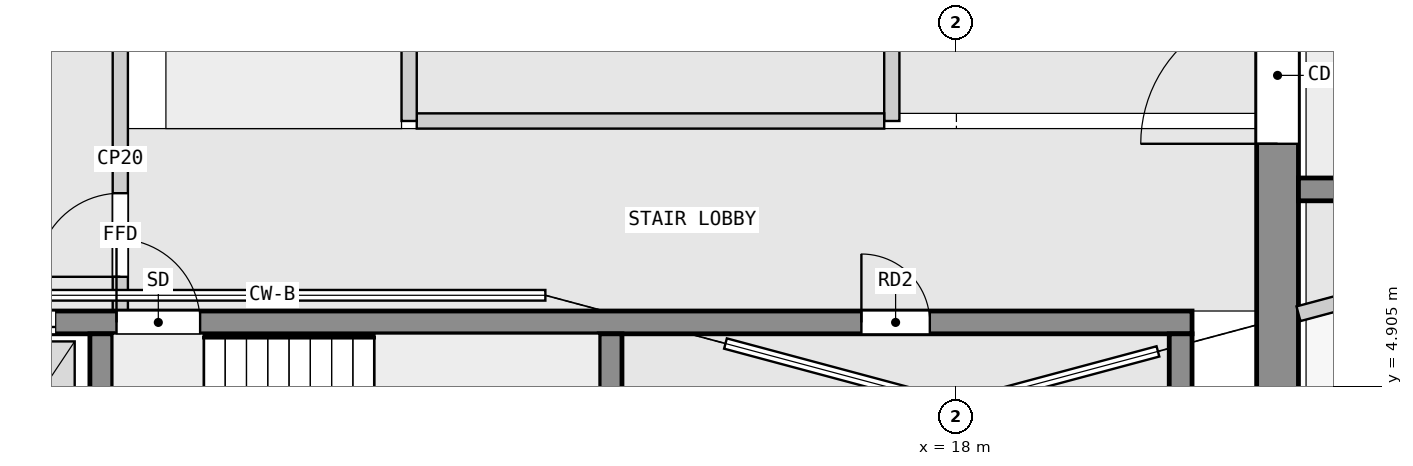
"""IFC4 building model, lengths in metres.
Left out: names, types, materials, properties, quantities, classifications, styles, units other than length and angle.
Written with IfcOpenShell. Run it as: python <this file> out.ifc"""

import sys

from ifc_helpers import new_model, si_unit, direction, frame, frame_2d, origin, place, context, subcontext, project, spatial, rectangle, extrude, element, fill, save


model = new_model("IFC4")
c1 = context("Model", 3, precision=1e-05, world=origin(), true_north=direction((0.0, 1.0)))
c2 = subcontext(c1, "Body", "Model", "MODEL_VIEW")
j1 = project(units=[si_unit("LENGTHUNIT", "METRE"), si_unit("PLANEANGLEUNIT", "RADIAN")], contexts=[c1])
p1 = place(None, origin())
s1 = spatial("IfcSite", under=j1, at=p1, CompositionType="ELEMENT")
p2 = place(p1, origin())
s2 = spatial("IfcBuilding", under=s1, at=p2, CompositionType="ELEMENT")
p3 = place(p2, frame((0.0, 0.0, 184.9)))
s3 = spatial("IfcBuildingStorey", under=s2, at=p3, CompositionType="ELEMENT", Elevation=184.9)
p4 = place(p3, frame((22.225, 2.5, 0.0), z_axis=(0.0, 0.0, 1.0), x_axis=(0.0, 1.0, 0.0)))
e1 = element("IfcWall", 1, at=p4, inside=s3, PredefinedType="SHEAR", context=c2, shape_type="SweptSolid", body=[
    extrude(rectangle(XDim=14.95, YDim=0.55, at=frame_2d((7.475, 0.0))), origin(), (0.0, 0.0, 1.0), 5.75),
])
p5 = place(p4, frame((5.6, 0.0, 0.0)))
e2 = element("IfcOpeningElement", 2, at=p5, cuts=e1, PredefinedType="OPENING", context=c2, shape_type="SweptSolid", body=[
    extrude(rectangle(XDim=1.8, YDim=2.1, at=frame_2d((0.9, 1.05))), frame((0.0, 0.285, 0.0), z_axis=(0.0, -1.0, 0.0), x_axis=(1.0, 0.0, 0.0)), (0.0, 0.0, 1.0), 0.57),
])
for number, where, z_axis, x_axis in (
    (3, (6.75, 2.8, 0.0), (0.0, 0.0, 1.0), (0.0, 1.0, 0.0)),
    (4, (13.45, 2.8, 0.0), (0.0, 0.0, 1.0), (0.0, 1.0, 0.0)),
    (5, (20.95, 2.8, 0.0), (0.0, 0.0, 1.0), (0.0, 1.0, 0.0)),
):
    element("IfcWall", number, at=place(p3, frame(where, z_axis=z_axis, x_axis=x_axis)), inside=s3, PredefinedType="SHEAR", context=c2, shape_type="SweptSolid", body=[
        extrude(rectangle(XDim=2.8, YDim=0.3, at=frame_2d((1.4, 0.0))), origin(), (0.0, 0.0, 1.0), 5.75),
    ])
p6 = place(p3, frame((2.3, 5.75, 0.0), z_axis=(0.0, 0.0, 1.0), x_axis=(1.0, 0.0, 0.0)))
e6 = element("IfcWall", 6, at=p6, inside=s3, PredefinedType="SHEAR", context=c2, shape_type="SweptSolid", body=[
    extrude(rectangle(XDim=18.8, YDim=0.3, at=frame_2d((9.4, 0.0))), origin(), (0.0, 0.0, 1.0), 5.75),
])
p7 = place(p6, frame((4.65, 0.0, 0.0)))
e7 = element("IfcOpeningElement", 7, at=p7, cuts=e6, PredefinedType="OPENING", context=c2, shape_type="SweptSolid", body=[
    extrude(rectangle(XDim=1.1, YDim=2.1, at=frame_2d((0.55, 1.05))), frame((0.0, 0.16, 0.0), z_axis=(0.0, -1.0, 0.0), x_axis=(1.0, 0.0, 0.0)), (0.0, 0.0, 1.0), 0.32),
])
p8 = place(p6, frame((0.45, 0.0, 0.0)))
e8 = element("IfcOpeningElement", 8, at=p8, cuts=e6, PredefinedType="OPENING", context=c2, shape_type="SweptSolid", body=[
    extrude(rectangle(XDim=1.1, YDim=2.1, at=frame_2d((0.55, 1.05))), frame((0.0, 0.16, 0.0), z_axis=(0.0, -1.0, 0.0), x_axis=(1.0, 0.0, 0.0)), (0.0, 0.0, 1.0), 0.32),
])
p9 = place(p6, frame((2.75, 0.0, 0.0)))
e9 = element("IfcOpeningElement", 9, at=p9, cuts=e6, PredefinedType="OPENING", context=c2, shape_type="SweptSolid", body=[
    extrude(rectangle(XDim=1.1, YDim=2.1, at=frame_2d((0.55, 1.05))), frame((0.0, 0.16, 0.0), z_axis=(0.0, -1.0, 0.0), x_axis=(1.0, 0.0, 0.0)), (0.0, 0.0, 1.0), 0.32),
])
p10 = place(p6, frame((14.45, 0.0, 0.0)))
e10 = element("IfcOpeningElement", 10, at=p10, cuts=e6, PredefinedType="OPENING", context=c2, shape_type="SweptSolid", body=[
    extrude(rectangle(XDim=0.9, YDim=2.1, at=frame_2d((0.45, 1.05))), frame((0.0, 0.16, 0.0), z_axis=(0.0, -1.0, 0.0), x_axis=(1.0, 0.0, 0.0)), (0.0, 0.0, 1.0), 0.32),
])
p11 = place(p3, frame((22.5, 7.5, 0.0), z_axis=(0.0, 0.0, 1.0), x_axis=(1.0, 0.0, 0.0)))
e11 = element("IfcWall", 11, at=p11, inside=s3, PredefinedType="SHEAR", context=c2, shape_type="SweptSolid", body=[
    extrude(rectangle(XDim=22.5, YDim=0.3, at=frame_2d((11.25, 0.0))), origin(), (0.0, 0.0, 1.0), 5.75),
])
p12 = place(p11, frame((20.1, 0.0, 0.0)))
e12 = element("IfcOpeningElement", 12, at=p12, cuts=e11, PredefinedType="OPENING", context=c2, shape_type="SweptSolid", body=[
    extrude(rectangle(XDim=1.8, YDim=2.1, at=frame_2d((0.9, 1.05))), frame((0.0, 0.16, 0.0), z_axis=(0.0, -1.0, 0.0), x_axis=(1.0, 0.0, 0.0)), (0.0, 0.0, 1.0), 0.32),
])
p13 = place(p11, frame((6.1, 0.0, 0.0)))
e13 = element("IfcOpeningElement", 13, at=p13, cuts=e11, PredefinedType="OPENING", context=c2, shape_type="SweptSolid", body=[
    extrude(rectangle(XDim=1.1, YDim=2.1, at=frame_2d((0.55, 1.05))), frame((0.0, 0.16, 0.0), z_axis=(0.0, -1.0, 0.0), x_axis=(1.0, 0.0, 0.0)), (0.0, 0.0, 1.0), 0.32),
])
p14 = place(p11, frame((16.1, 0.0, 0.0)))
e14 = element("IfcOpeningElement", 14, at=p14, cuts=e11, PredefinedType="OPENING", context=c2, shape_type="SweptSolid", body=[
    extrude(rectangle(XDim=1.0, YDim=2.1, at=frame_2d((0.5, 1.05))), frame((0.0, 0.16, 0.0), z_axis=(0.0, -1.0, 0.0), x_axis=(1.0, 0.0, 0.0)), (0.0, 0.0, 1.0), 0.32),
])
p15 = place(p3, frame((7.0, 5.9, 0.0), z_axis=(0.0, 0.0, 1.0), x_axis=(0.0, 1.0, 0.0)))
e15 = element("IfcWall", 15, at=p15, inside=s3, PredefinedType="PARTITIONING", context=c2, shape_type="SweptSolid", body=[
    extrude(rectangle(XDim=4.0, YDim=0.2, at=frame_2d((2.0, 0.0))), origin(), (0.0, 0.0, 1.0), 5.75),
])
p16 = place(p15, frame((0.45, 0.0, 0.0)))
e16 = element("IfcOpeningElement", 16, at=p16, cuts=e15, PredefinedType="OPENING", context=c2, shape_type="SweptSolid", body=[
    extrude(rectangle(XDim=1.1, YDim=2.1, at=frame_2d((0.55, 1.05))), frame((0.0, 0.11, 0.0), z_axis=(0.0, -1.0, 0.0), x_axis=(1.0, 0.0, 0.0)), (0.0, 0.0, 1.0), 0.22),
])
p17 = place(p3, frame((10.8, 8.4, 0.0), z_axis=(0.0, 0.0, 1.0), x_axis=(0.0, 1.0, 0.0)))
e17 = element("IfcWall", 17, at=p17, inside=s3, PredefinedType="PARTITIONING", context=c2, shape_type="SweptSolid", body=[
    extrude(rectangle(XDim=3.8, YDim=0.2, at=frame_2d((1.9, 0.0))), origin(), (0.0, 0.0, 1.0), 5.75),
])
p18 = place(p3, frame((10.9, 8.4, 0.0), z_axis=(0.0, 0.0, 1.0), x_axis=(1.0, 0.0, 0.0)))
e18 = element("IfcWall", 18, at=p18, inside=s3, PredefinedType="PARTITIONING", context=c2, shape_type="SweptSolid", body=[
    extrude(rectangle(XDim=6.15, YDim=0.2, at=frame_2d((3.075, 0.0))), origin(), (0.0, 0.0, 1.0), 5.75),
])
p19 = place(p3, frame((17.15, 8.4, 0.0), z_axis=(0.0, 0.0, 1.0), x_axis=(0.0, 1.0, 0.0)))
e19 = element("IfcWall", 19, at=p19, inside=s3, PredefinedType="PARTITIONING", context=c2, shape_type="SweptSolid", body=[
    extrude(rectangle(XDim=3.8, YDim=0.2, at=frame_2d((1.9, 0.0))), origin(), (0.0, 0.0, 1.0), 5.75),
])
p20 = place(p3, frame((22.5, 5.864, 0.0), z_axis=(0.0, 0.0, 1.0), x_axis=(0.96602336302, 0.258454758323, 0.0)))
e20 = element("IfcWall", 20, at=p20, inside=s3, PredefinedType="PARTITIONING", context=c2, shape_type="SweptSolid", body=[
    extrude(rectangle(XDim=0.94, YDim=0.2, at=frame_2d((0.47, 0.0))), origin(), (0.0, 0.0, 1.0), 5.75),
])
p21 = place(p16, origin())
e21 = element("IfcDoor", 21, at=p21, inside=s3, OperationType="SINGLE_SWING_LEFT", PredefinedType="DOOR", context=c2, shape_type="SweptSolid", body=[
    extrude(rectangle(XDim=1.1, YDim=2.1, at=frame_2d((0.55, 1.05))), frame((0.0, 0.025, 0.0), z_axis=(0.0, -1.0, 0.0), x_axis=(1.0, 0.0, 0.0)), (0.0, 0.0, 1.0), 0.05),
])
fill(e16, e21)
p22 = place(p7, origin())
e22 = element("IfcDoor", 22, at=p22, inside=s3, OperationType="SINGLE_SWING_LEFT", PredefinedType="DOOR", context=c2, shape_type="SweptSolid", body=[
    extrude(rectangle(XDim=1.1, YDim=2.1, at=frame_2d((0.55, 1.05))), frame((0.0, 0.025, 0.0), z_axis=(0.0, -1.0, 0.0), x_axis=(1.0, 0.0, 0.0)), (0.0, 0.0, 1.0), 0.05),
])
fill(e7, e22)
p23 = place(p9, origin())
e23 = element("IfcDoor", 23, at=p23, inside=s3, OperationType="DOUBLE_DOOR_SLIDING", PredefinedType="DOOR", context=c2, shape_type="SweptSolid", body=[
    extrude(rectangle(XDim=1.1, YDim=2.1, at=frame_2d((0.55, 1.05))), frame((0.0, 0.025, 0.0), z_axis=(0.0, -1.0, 0.0), x_axis=(1.0, 0.0, 0.0)), (0.0, 0.0, 1.0), 0.05),
])
fill(e9, e23)
p24 = place(p5, origin())
e24 = element("IfcDoor", 24, at=p24, inside=s3, OperationType="DOUBLE_DOOR_SINGLE_SWING", PredefinedType="DOOR", context=c2, shape_type="SweptSolid", body=[
    extrude(rectangle(XDim=1.8, YDim=2.1, at=frame_2d((0.9, 1.05))), frame((0.0, 0.025, 0.0), z_axis=(0.0, -1.0, 0.0), x_axis=(1.0, 0.0, 0.0)), (0.0, 0.0, 1.0), 0.05),
])
fill(e2, e24)
p25 = place(p10, origin())
e25 = element("IfcDoor", 25, at=p25, inside=s3, OperationType="SINGLE_SWING_LEFT", PredefinedType="DOOR", context=c2, shape_type="SweptSolid", body=[
    extrude(rectangle(XDim=0.9, YDim=2.1, at=frame_2d((0.45, 1.05))), frame((0.0, 0.025, 0.0), z_axis=(0.0, -1.0, 0.0), x_axis=(1.0, 0.0, 0.0)), (0.0, 0.0, 1.0), 0.05),
])
fill(e10, e25)
save(model, sys.argv[1])
